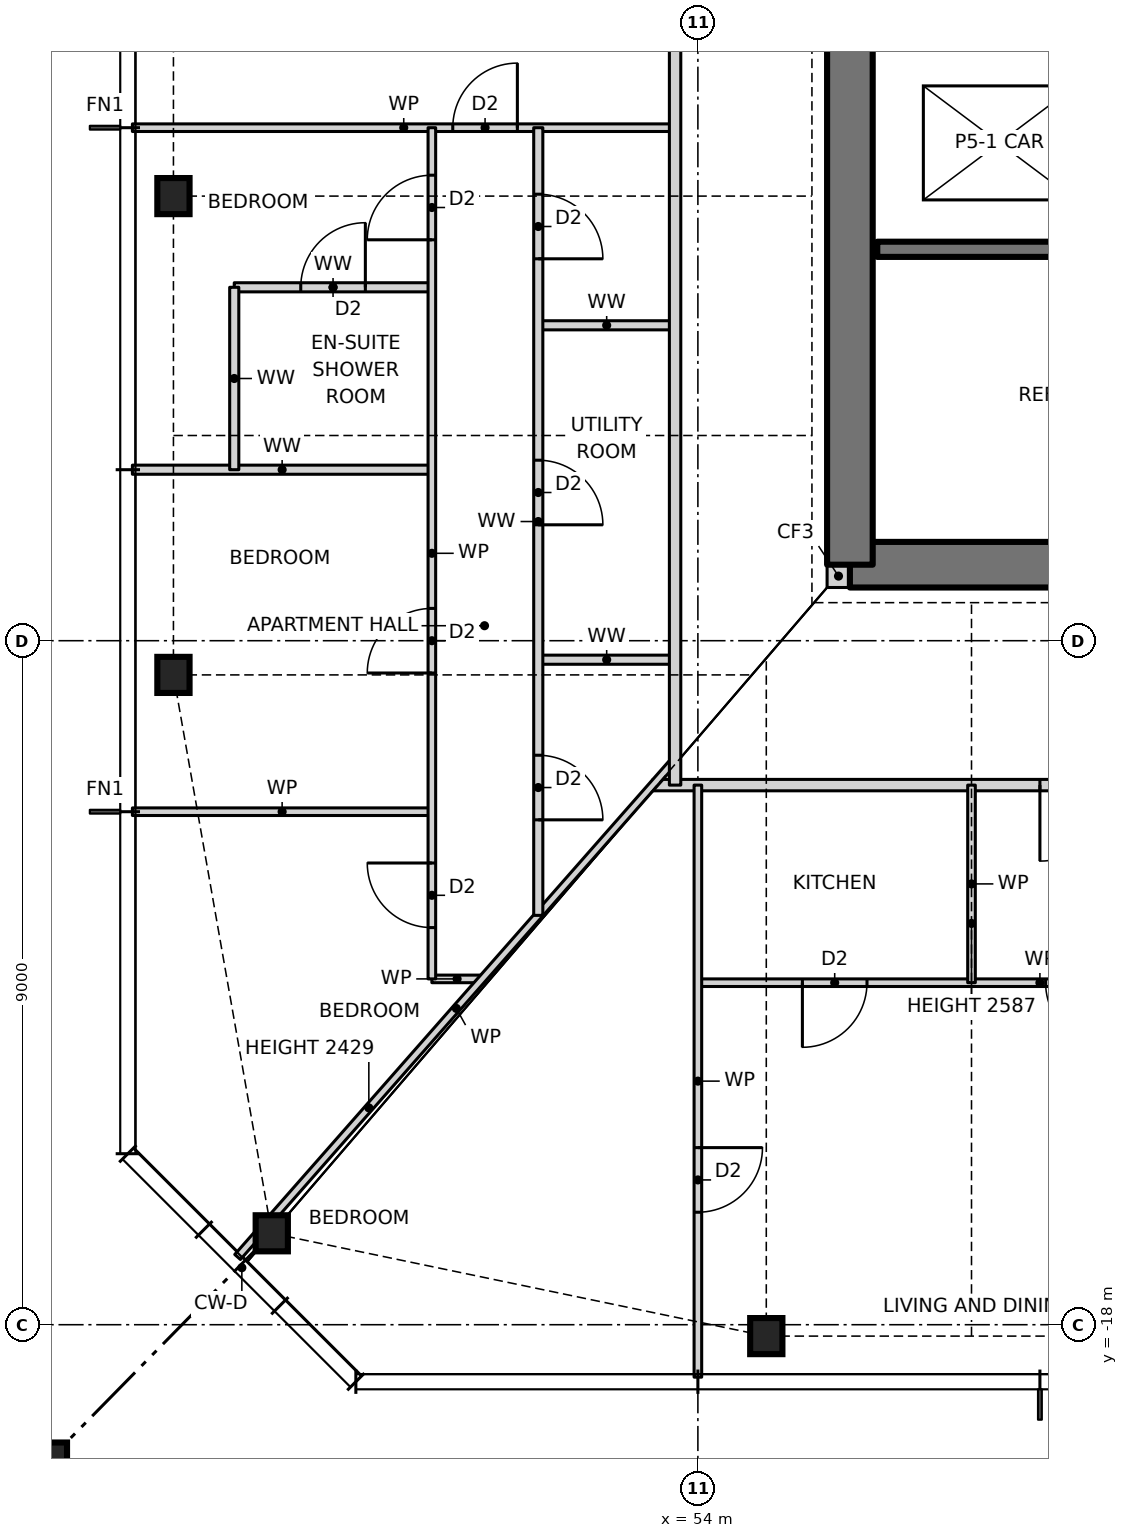
"""IFC4 building model, lengths in metres.
Left out: names, types, materials, properties, quantities, classifications, styles, units other than length and angle.
Written with IfcOpenShell. Run it as: python <this file> out.ifc"""

import sys

from ifc_helpers import new_model, si_unit, direction, frame, frame_2d, origin, origin_2d, place, context, subcontext, project, spatial, rectangle, hollow_rectangle, i_section, extrude, element, fill, save


model = new_model("IFC4")
c1 = context("Model", 3, precision=1e-05, world=origin(), true_north=direction((0.0, 1.0)))
c2 = subcontext(c1, "Body", "Model", "MODEL_VIEW")
j1 = project(units=[si_unit("LENGTHUNIT", "METRE"), si_unit("PLANEANGLEUNIT", "RADIAN")], contexts=[c1])
p1 = place(None, origin())
s1 = spatial("IfcSite", under=j1, at=p1, CompositionType="ELEMENT")
p2 = place(p1, origin())
s2 = spatial("IfcBuilding", under=s1, at=p2, CompositionType="ELEMENT")
p3 = place(p2, frame((0.0, 0.0, 60.5)))
s3 = spatial("IfcBuildingStorey", under=s2, at=p3, CompositionType="ELEMENT", Elevation=60.5)
for number, where, z_axis, x_axis in (
    (1, (48.394, -16.797, 0.0), (0.0, 0.0, 1.0), (1.0, 0.0, 0.0)),
    (2, (54.9, -18.15, 0.0), (0.0, 0.0, 1.0), (1.0, 0.0, 0.0)),
    (3, (47.1, -3.15, 0.0), (0.0, 0.0, 1.0), (1.0, 0.0, 0.0)),
    (4, (47.1, -9.45, 0.0), (0.0, 0.0, 1.0), (1.0, 0.0, 0.0)),
):
    element("IfcColumn", number, at=place(p3, frame(where, z_axis=z_axis, x_axis=x_axis)), inside=s3, PredefinedType="COLUMN", context=c2, shape_type="SweptSolid", body=[
        extrude(i_section(OverallWidth=0.424, OverallDepth=0.475, WebThickness=0.048, FlangeThickness=0.077, at=origin_2d()), origin(), (0.0, 0.0, 1.0), 3.5),
    ])
p4 = place(p3, frame((45.1, -20.15, 0.0), z_axis=(0.0, 0.0, 1.0), x_axis=(1.0, 0.0, 0.0)))
e5 = element("IfcColumn", 5, at=p4, inside=s3, PredefinedType="COLUMN", context=c2, shape_type="SweptSolid", body=[
    extrude(hollow_rectangle(XDim=1.2, YDim=1.2, WallThickness=0.07, at=origin_2d()), origin(), (0.0, 0.0, 1.0), 3.5),
])
p5 = place(p3, frame((55.7, -8.15, 0.0), z_axis=(0.0, 0.0, 1.0), x_axis=(1.0, 0.0, 0.0)))
e6 = element("IfcWall", 6, at=p5, inside=s3, PredefinedType="SOLIDWALL", context=c2, shape_type="SweptSolid", body=[
    extrude(rectangle(XDim=0.3, YDim=0.3, at=frame_2d((0.15, 0.0))), origin(), (0.0, 0.0, 1.0), 3.5),
])
p6 = place(p3, frame((56.0, -8.0, 0.0), z_axis=(0.0, 0.0, 1.0), x_axis=(1.0, 0.0, 0.0)))
e7 = element("IfcWall", 7, at=p6, inside=s3, PredefinedType="SHEAR", context=c2, shape_type="SweptSolid", body=[
    extrude(rectangle(XDim=14.0, YDim=0.6, at=frame_2d((7.0, 0.0))), origin(), (0.0, 0.0, 1.0), 3.5),
])
p7 = place(p6, frame((2.7, 0.0, 0.0)))
e8 = element("IfcOpeningElement", 8, at=p7, cuts=e7, PredefinedType="OPENING", context=c2, shape_type="SweptSolid", body=[
    extrude(rectangle(XDim=0.9, YDim=2.1, at=frame_2d((0.45, 1.05))), frame((0.0, 0.31, 0.0), z_axis=(0.0, -1.0, 0.0), x_axis=(1.0, 0.0, 0.0)), (0.0, 0.0, 1.0), 0.62),
])
p8 = place(p6, frame((7.7, 0.0, 0.0)))
e9 = element("IfcOpeningElement", 9, at=p8, cuts=e7, PredefinedType="OPENING", context=c2, shape_type="SweptSolid", body=[
    extrude(rectangle(XDim=0.9, YDim=2.1, at=frame_2d((0.45, 1.05))), frame((0.0, 0.31, 0.0), z_axis=(0.0, -1.0, 0.0), x_axis=(1.0, 0.0, 0.0)), (0.0, 0.0, 1.0), 0.62),
])
p9 = place(p3, frame((56.0, 8.0, 0.0), z_axis=(0.0, 0.0, 1.0), x_axis=(0.0, -1.0, 0.0)))
e10 = element("IfcWall", 10, at=p9, inside=s3, PredefinedType="SHEAR", context=c2, shape_type="SweptSolid", body=[
    extrude(rectangle(XDim=16.0, YDim=0.6, at=frame_2d((8.0, 0.0))), origin(), (0.0, 0.0, 1.0), 3.5),
])
p10 = place(p9, frame((7.5, 0.0, 0.0)))
e11 = element("IfcOpeningElement", 11, at=p10, cuts=e10, PredefinedType="OPENING", context=c2, shape_type="SweptSolid", body=[
    extrude(rectangle(XDim=1.0, YDim=2.1, at=frame_2d((0.5, 1.05))), frame((0.0, 0.31, 0.0), z_axis=(0.0, -1.0, 0.0), x_axis=(1.0, 0.0, 0.0)), (0.0, 0.0, 1.0), 0.62),
])
p11 = place(p3, frame((54.0, -13.5, 0.0), z_axis=(0.0, 0.0, 1.0), x_axis=(1.0, 0.0, 0.0)))
e12 = element("IfcWall", 12, at=p11, inside=s3, PredefinedType="PARTITIONING", context=c2, shape_type="SweptSolid", body=[
    extrude(rectangle(XDim=9.0, YDim=0.1, at=frame_2d((4.5, 0.0))), origin(), (0.0, 0.0, 1.0), 3.27),
])
p12 = place(p11, frame((1.375, 0.0, 0.0)))
e13 = element("IfcOpeningElement", 13, at=p12, cuts=e12, PredefinedType="OPENING", context=c2, shape_type="SweptSolid", body=[
    extrude(rectangle(XDim=0.85, YDim=2.1, at=frame_2d((0.425, 1.05))), frame((0.0, 0.06, 0.0), z_axis=(0.0, -1.0, 0.0), x_axis=(1.0, 0.0, 0.0)), (0.0, 0.0, 1.0), 0.12),
])
p13 = place(p11, frame((4.575, 0.0, 0.0)))
e14 = element("IfcOpeningElement", 14, at=p13, cuts=e12, PredefinedType="OPENING", context=c2, shape_type="SweptSolid", body=[
    extrude(rectangle(XDim=0.85, YDim=2.1, at=frame_2d((0.425, 1.05))), frame((0.0, 0.06, 0.0), z_axis=(0.0, -1.0, 0.0), x_axis=(1.0, 0.0, 0.0)), (0.0, 0.0, 1.0), 0.12),
])
p14 = place(p3, frame((50.5, -13.45, 0.0), z_axis=(0.0, 0.0, 1.0), x_axis=(1.0, 0.0, 0.0)))
e15 = element("IfcWall", 15, at=p14, inside=s3, PredefinedType="PARTITIONING", context=c2, shape_type="SweptSolid", body=[
    extrude(rectangle(XDim=0.664, YDim=0.1, at=frame_2d((0.332, 0.0))), origin(), (0.0, 0.0, 1.0), 3.27),
])
p15 = place(p3, frame((46.56, -11.25, 0.0), z_axis=(0.0, 0.0, 1.0), x_axis=(1.0, 0.0, 0.0)))
e16 = element("IfcWall", 16, at=p15, inside=s3, PredefinedType="PARTITIONING", context=c2, shape_type="SweptSolid", body=[
    extrude(rectangle(XDim=3.94, YDim=0.1, at=frame_2d((1.97, 0.0))), origin(), (0.0, 0.0, 1.0), 3.27),
])
p16 = place(p3, frame((53.408, -10.9, 0.0), z_axis=(0.0, 0.0, 1.0), x_axis=(1.0, 0.0, 0.0)))
e17 = element("IfcWall", 17, at=p16, inside=s3, PredefinedType="PARTITIONING", context=c2, shape_type="SweptSolid", body=[
    extrude(rectangle(XDim=19.184, YDim=0.15, at=frame_2d((9.592, 0.0))), origin(), (0.0, 0.0, 1.0), 3.27),
])
p17 = place(p16, frame((5.092, 0.0, 0.0)))
e18 = element("IfcOpeningElement", 18, at=p17, cuts=e17, PredefinedType="OPENING", context=c2, shape_type="SweptSolid", body=[
    extrude(rectangle(XDim=1.0, YDim=2.1, at=frame_2d((0.5, 1.05))), frame((0.0, 0.085, 0.0), z_axis=(0.0, -1.0, 0.0), x_axis=(1.0, 0.0, 0.0)), (0.0, 0.0, 1.0), 0.17),
])
p18 = place(p16, frame((10.492, 0.0, 0.0)))
e19 = element("IfcOpeningElement", 19, at=p18, cuts=e17, PredefinedType="OPENING", context=c2, shape_type="SweptSolid", body=[
    extrude(rectangle(XDim=1.0, YDim=2.1, at=frame_2d((0.5, 1.05))), frame((0.0, 0.085, 0.0), z_axis=(0.0, -1.0, 0.0), x_axis=(1.0, 0.0, 0.0)), (0.0, 0.0, 1.0), 0.17),
])
p19 = place(p3, frame((51.9, -9.25, 0.0), z_axis=(0.0, 0.0, 1.0), x_axis=(1.0, 0.0, 0.0)))
e20 = element("IfcWall", 20, at=p19, inside=s3, PredefinedType="PARTITIONING", context=c2, shape_type="SweptSolid", body=[
    extrude(rectangle(XDim=1.8, YDim=0.12, at=frame_2d((0.9, 0.0))), origin(), (0.0, 0.0, 1.0), 3.27),
])
p20 = place(p3, frame((46.56, -6.75, 0.0), z_axis=(0.0, 0.0, 1.0), x_axis=(1.0, 0.0, 0.0)))
e21 = element("IfcWall", 21, at=p20, inside=s3, PredefinedType="PARTITIONING", context=c2, shape_type="SweptSolid", body=[
    extrude(rectangle(XDim=3.94, YDim=0.12, at=frame_2d((1.97, 0.0))), origin(), (0.0, 0.0, 1.0), 3.27),
])
p21 = place(p3, frame((51.9, -4.85, 0.0), z_axis=(0.0, 0.0, 1.0), x_axis=(1.0, 0.0, 0.0)))
e22 = element("IfcWall", 22, at=p21, inside=s3, PredefinedType="PARTITIONING", context=c2, shape_type="SweptSolid", body=[
    extrude(rectangle(XDim=1.8, YDim=0.12, at=frame_2d((0.9, 0.0))), origin(), (0.0, 0.0, 1.0), 3.27),
])
p22 = place(p3, frame((47.9, -4.35, 0.0), z_axis=(0.0, 0.0, 1.0), x_axis=(1.0, 0.0, 0.0)))
e23 = element("IfcWall", 23, at=p22, inside=s3, PredefinedType="PARTITIONING", context=c2, shape_type="SweptSolid", body=[
    extrude(rectangle(XDim=2.6, YDim=0.12, at=frame_2d((1.3, 0.0))), origin(), (0.0, 0.0, 1.0), 3.27),
])
p23 = place(p22, frame((0.875, 0.0, 0.0)))
e24 = element("IfcOpeningElement", 24, at=p23, cuts=e23, PredefinedType="OPENING", context=c2, shape_type="SweptSolid", body=[
    extrude(rectangle(XDim=0.85, YDim=2.1, at=frame_2d((0.425, 1.05))), frame((0.0, 0.07, 0.0), z_axis=(0.0, -1.0, 0.0), x_axis=(1.0, 0.0, 0.0)), (0.0, 0.0, 1.0), 0.14),
])
p24 = place(p3, frame((56.36, -3.85, 0.0), z_axis=(0.0, 0.0, 1.0), x_axis=(1.0, 0.0, 0.0)))
e25 = element("IfcWall", 25, at=p24, inside=s3, PredefinedType="SOLIDWALL", context=c2, shape_type="SweptSolid", body=[
    extrude(rectangle(XDim=9.94, YDim=0.2, at=frame_2d((4.97, 0.0))), origin(), (0.0, 0.0, 1.0), 3.5),
])
p25 = place(p3, frame((46.56, -2.25, 0.0), z_axis=(0.0, 0.0, 1.0), x_axis=(1.0, 0.0, 0.0)))
e26 = element("IfcWall", 26, at=p25, inside=s3, PredefinedType="PARTITIONING", context=c2, shape_type="SweptSolid", body=[
    extrude(rectangle(XDim=7.14, YDim=0.1, at=frame_2d((3.57, 0.0))), origin(), (0.0, 0.0, 1.0), 3.27),
])
p26 = place(p25, frame((4.215, 0.0, 0.0)))
e27 = element("IfcOpeningElement", 27, at=p26, cuts=e26, PredefinedType="OPENING", context=c2, shape_type="SweptSolid", body=[
    extrude(rectangle(XDim=0.85, YDim=2.1, at=frame_2d((0.425, 1.05))), frame((0.0, 0.06, 0.0), z_axis=(0.0, -1.0, 0.0), x_axis=(1.0, 0.0, 0.0)), (0.0, 0.0, 1.0), 0.12),
])
p27 = place(p3, frame((47.944, -17.109, 0.0), z_axis=(0.0, 0.0, 1.0), x_axis=(0.660612734851, 0.750726857487, 0.0)))
e28 = element("IfcWall", 28, at=p27, inside=s3, PredefinedType="PARTITIONING", context=c2, shape_type="SweptSolid", body=[
    extrude(rectangle(XDim=8.713, YDim=0.1, at=frame_2d((4.356, 0.0))), origin(), (0.0, 0.0, 1.0), 2.429),
])
p28 = place(p3, frame((57.6, -13.5, 0.0), z_axis=(0.0, 0.0, 1.0), x_axis=(0.0, 1.0, 0.0)))
e29 = element("IfcWall", 29, at=p28, inside=s3, PredefinedType="PARTITIONING", context=c2, shape_type="SweptSolid", body=[
    extrude(rectangle(XDim=2.6, YDim=0.1, at=frame_2d((1.3, 0.0))), origin(), (0.0, 0.0, 1.0), 2.587),
])
p29 = place(p3, frame((54.0, -18.69, 0.0), z_axis=(0.0, 0.0, 1.0), x_axis=(0.0, 1.0, 0.0)))
e30 = element("IfcWall", 30, at=p29, inside=s3, PredefinedType="PARTITIONING", context=c2, shape_type="SweptSolid", body=[
    extrude(rectangle(XDim=7.79, YDim=0.1, at=frame_2d((3.895, 0.0))), origin(), (0.0, 0.0, 1.0), 3.27),
])
p30 = place(p29, frame((2.17, 0.0, 0.0)))
e31 = element("IfcOpeningElement", 31, at=p30, cuts=e30, PredefinedType="OPENING", context=c2, shape_type="SweptSolid", body=[
    extrude(rectangle(XDim=0.85, YDim=2.1, at=frame_2d((0.425, 1.05))), frame((0.0, 0.06, 0.0), z_axis=(0.0, -1.0, 0.0), x_axis=(1.0, 0.0, 0.0)), (0.0, 0.0, 1.0), 0.12),
])
p31 = place(p3, frame((53.7, -10.9, 0.0), z_axis=(0.0, 0.0, 1.0), x_axis=(0.0, 1.0, 0.0)))
e32 = element("IfcWall", 32, at=p31, inside=s3, PredefinedType="PARTITIONING", context=c2, shape_type="SweptSolid", body=[
    extrude(rectangle(XDim=21.468, YDim=0.15, at=frame_2d((10.734, 0.0))), origin(), (0.0, 0.0, 1.0), 3.27),
])
p32 = place(p31, frame((16.65, 0.0, 0.0)))
e33 = element("IfcOpeningElement", 33, at=p32, cuts=e32, PredefinedType="OPENING", context=c2, shape_type="SweptSolid", body=[
    extrude(rectangle(XDim=1.0, YDim=2.1, at=frame_2d((0.5, 1.05))), frame((0.0, 0.085, 0.0), z_axis=(0.0, -1.0, 0.0), x_axis=(1.0, 0.0, 0.0)), (0.0, 0.0, 1.0), 0.17),
])
p33 = place(p31, frame((11.25, 0.0, 0.0)))
e34 = element("IfcOpeningElement", 34, at=p33, cuts=e32, PredefinedType="OPENING", context=c2, shape_type="SweptSolid", body=[
    extrude(rectangle(XDim=1.0, YDim=2.1, at=frame_2d((0.5, 1.05))), frame((0.0, 0.085, 0.0), z_axis=(0.0, -1.0, 0.0), x_axis=(1.0, 0.0, 0.0)), (0.0, 0.0, 1.0), 0.17),
])
p34 = place(p3, frame((51.9, -12.614, 0.0), z_axis=(0.0, 0.0, 1.0), x_axis=(0.0, 1.0, 0.0)))
e35 = element("IfcWall", 35, at=p34, inside=s3, PredefinedType="PARTITIONING", context=c2, shape_type="SweptSolid", body=[
    extrude(rectangle(XDim=10.364, YDim=0.12, at=frame_2d((5.182, 0.0))), origin(), (0.0, 0.0, 1.0), 3.27),
])
p35 = place(p34, frame((8.639, 0.0, 0.0)))
e36 = element("IfcOpeningElement", 36, at=p35, cuts=e35, PredefinedType="OPENING", context=c2, shape_type="SweptSolid", body=[
    extrude(rectangle(XDim=0.85, YDim=2.1, at=frame_2d((0.425, 1.05))), frame((0.0, 0.07, 0.0), z_axis=(0.0, -1.0, 0.0), x_axis=(1.0, 0.0, 0.0)), (0.0, 0.0, 1.0), 0.14),
])
p36 = place(p34, frame((5.139, 0.0, 0.0)))
e37 = element("IfcOpeningElement", 37, at=p36, cuts=e35, PredefinedType="OPENING", context=c2, shape_type="SweptSolid", body=[
    extrude(rectangle(XDim=0.85, YDim=2.1, at=frame_2d((0.425, 1.05))), frame((0.0, 0.07, 0.0), z_axis=(0.0, -1.0, 0.0), x_axis=(1.0, 0.0, 0.0)), (0.0, 0.0, 1.0), 0.14),
])
p37 = place(p34, frame((1.257, 0.0, 0.0)))
e38 = element("IfcOpeningElement", 38, at=p37, cuts=e35, PredefinedType="OPENING", context=c2, shape_type="SweptSolid", body=[
    extrude(rectangle(XDim=0.85, YDim=2.1, at=frame_2d((0.425, 1.05))), frame((0.0, 0.07, 0.0), z_axis=(0.0, -1.0, 0.0), x_axis=(1.0, 0.0, 0.0)), (0.0, 0.0, 1.0), 0.14),
])
p38 = place(p3, frame((50.5, -13.45, 0.0), z_axis=(0.0, 0.0, 1.0), x_axis=(0.0, 1.0, 0.0)))
e39 = element("IfcWall", 39, at=p38, inside=s3, PredefinedType="PARTITIONING", context=c2, shape_type="SweptSolid", body=[
    extrude(rectangle(XDim=11.2, YDim=0.1, at=frame_2d((5.6, 0.0))), origin(), (0.0, 0.0, 1.0), 3.27),
])
p39 = place(p38, frame((9.725, 0.0, 0.0)))
e40 = element("IfcOpeningElement", 40, at=p39, cuts=e39, PredefinedType="OPENING", context=c2, shape_type="SweptSolid", body=[
    extrude(rectangle(XDim=0.85, YDim=2.1, at=frame_2d((0.425, 1.05))), frame((0.0, 0.06, 0.0), z_axis=(0.0, -1.0, 0.0), x_axis=(1.0, 0.0, 0.0)), (0.0, 0.0, 1.0), 0.12),
])
p40 = place(p38, frame((4.025, 0.0, 0.0)))
e41 = element("IfcOpeningElement", 41, at=p40, cuts=e39, PredefinedType="OPENING", context=c2, shape_type="SweptSolid", body=[
    extrude(rectangle(XDim=0.85, YDim=2.1, at=frame_2d((0.425, 1.05))), frame((0.0, 0.06, 0.0), z_axis=(0.0, -1.0, 0.0), x_axis=(1.0, 0.0, 0.0)), (0.0, 0.0, 1.0), 0.12),
])
p41 = place(p38, frame((0.675, 0.0, 0.0)))
e42 = element("IfcOpeningElement", 42, at=p41, cuts=e39, PredefinedType="OPENING", context=c2, shape_type="SweptSolid", body=[
    extrude(rectangle(XDim=0.85, YDim=2.1, at=frame_2d((0.425, 1.05))), frame((0.0, 0.06, 0.0), z_axis=(0.0, -1.0, 0.0), x_axis=(1.0, 0.0, 0.0)), (0.0, 0.0, 1.0), 0.12),
])
p42 = place(p3, frame((47.9, -6.75, 0.0), z_axis=(0.0, 0.0, 1.0), x_axis=(0.0, 1.0, 0.0)))
e43 = element("IfcWall", 43, at=p42, inside=s3, PredefinedType="PARTITIONING", context=c2, shape_type="SweptSolid", body=[
    extrude(rectangle(XDim=2.4, YDim=0.12, at=frame_2d((1.2, 0.0))), origin(), (0.0, 0.0, 1.0), 3.27),
])
p43 = place(p12, frame((0.85, 0.0, 0.0), z_axis=(0.0, 0.0, 1.0), x_axis=(-1.0, 0.0, 0.0)))
e44 = element("IfcDoor", 44, at=p43, inside=s3, OperationType="SINGLE_SWING_RIGHT", PredefinedType="DOOR", context=c2, shape_type="SweptSolid", body=[
    extrude(rectangle(XDim=0.85, YDim=2.1, at=frame_2d((0.425, 1.05))), frame((0.0, 0.025, 0.0), z_axis=(0.0, -1.0, 0.0), x_axis=(1.0, 0.0, 0.0)), (0.0, 0.0, 1.0), 0.05),
])
fill(e13, e44)
p44 = place(p17, frame((1.0, 0.0, 0.0), z_axis=(0.0, 0.0, 1.0), x_axis=(-1.0, 0.0, 0.0)))
e45 = element("IfcDoor", 45, at=p44, inside=s3, OperationType="SINGLE_SWING_RIGHT", PredefinedType="DOOR", context=c2, shape_type="SweptSolid", body=[
    extrude(rectangle(XDim=1.0, YDim=2.1, at=frame_2d((0.5, 1.05))), frame((0.0, 0.025, 0.0), z_axis=(0.0, -1.0, 0.0), x_axis=(1.0, 0.0, 0.0)), (0.0, 0.0, 1.0), 0.05),
])
fill(e18, e45)
p45 = place(p13, frame((0.85, 0.0, 0.0), z_axis=(0.0, 0.0, 1.0), x_axis=(-1.0, 0.0, 0.0)))
e46 = element("IfcDoor", 46, at=p45, inside=s3, OperationType="SINGLE_SWING_LEFT", PredefinedType="DOOR", context=c2, shape_type="SweptSolid", body=[
    extrude(rectangle(XDim=0.85, YDim=2.1, at=frame_2d((0.425, 1.05))), frame((0.0, 0.025, 0.0), z_axis=(0.0, -1.0, 0.0), x_axis=(1.0, 0.0, 0.0)), (0.0, 0.0, 1.0), 0.05),
])
fill(e14, e46)
p46 = place(p30, frame((0.85, 0.0, 0.0), z_axis=(0.0, 0.0, 1.0), x_axis=(-1.0, 0.0, 0.0)))
e47 = element("IfcDoor", 47, at=p46, inside=s3, OperationType="SINGLE_SWING_LEFT", PredefinedType="DOOR", context=c2, shape_type="SweptSolid", body=[
    extrude(rectangle(XDim=0.85, YDim=2.1, at=frame_2d((0.425, 1.05))), frame((0.0, 0.025, 0.0), z_axis=(0.0, -1.0, 0.0), x_axis=(1.0, 0.0, 0.0)), (0.0, 0.0, 1.0), 0.05),
])
fill(e31, e47)
p47 = place(p26, origin())
e48 = element("IfcDoor", 48, at=p47, inside=s3, OperationType="SINGLE_SWING_RIGHT", PredefinedType="DOOR", context=c2, shape_type="SweptSolid", body=[
    extrude(rectangle(XDim=0.85, YDim=2.1, at=frame_2d((0.425, 1.05))), frame((0.0, 0.025, 0.0), z_axis=(0.0, -1.0, 0.0), x_axis=(1.0, 0.0, 0.0)), (0.0, 0.0, 1.0), 0.05),
])
fill(e27, e48)
p48 = place(p23, origin())
e49 = element("IfcDoor", 49, at=p48, inside=s3, OperationType="SINGLE_SWING_RIGHT", PredefinedType="DOOR", context=c2, shape_type="SweptSolid", body=[
    extrude(rectangle(XDim=0.85, YDim=2.1, at=frame_2d((0.425, 1.05))), frame((0.0, 0.025, 0.0), z_axis=(0.0, -1.0, 0.0), x_axis=(1.0, 0.0, 0.0)), (0.0, 0.0, 1.0), 0.05),
])
fill(e24, e49)
p49 = place(p39, origin())
e50 = element("IfcDoor", 50, at=p49, inside=s3, OperationType="SINGLE_SWING_LEFT", PredefinedType="DOOR", context=c2, shape_type="SweptSolid", body=[
    extrude(rectangle(XDim=0.85, YDim=2.1, at=frame_2d((0.425, 1.05))), frame((0.0, 0.025, 0.0), z_axis=(0.0, -1.0, 0.0), x_axis=(1.0, 0.0, 0.0)), (0.0, 0.0, 1.0), 0.05),
])
fill(e40, e50)
p50 = place(p40, origin())
e51 = element("IfcDoor", 51, at=p50, inside=s3, OperationType="SINGLE_SWING_LEFT", PredefinedType="DOOR", context=c2, shape_type="SweptSolid", body=[
    extrude(rectangle(XDim=0.85, YDim=2.1, at=frame_2d((0.425, 1.05))), frame((0.0, 0.025, 0.0), z_axis=(0.0, -1.0, 0.0), x_axis=(1.0, 0.0, 0.0)), (0.0, 0.0, 1.0), 0.05),
])
fill(e41, e51)
p51 = place(p41, origin())
e52 = element("IfcDoor", 52, at=p51, inside=s3, OperationType="SINGLE_SWING_RIGHT", PredefinedType="DOOR", context=c2, shape_type="SweptSolid", body=[
    extrude(rectangle(XDim=0.85, YDim=2.1, at=frame_2d((0.425, 1.05))), frame((0.0, 0.025, 0.0), z_axis=(0.0, -1.0, 0.0), x_axis=(1.0, 0.0, 0.0)), (0.0, 0.0, 1.0), 0.05),
])
fill(e42, e52)
p52 = place(p35, frame((0.85, 0.0, 0.0), z_axis=(0.0, 0.0, 1.0), x_axis=(-1.0, 0.0, 0.0)))
e53 = element("IfcDoor", 53, at=p52, inside=s3, OperationType="SINGLE_SWING_RIGHT", PredefinedType="DOOR", context=c2, shape_type="SweptSolid", body=[
    extrude(rectangle(XDim=0.85, YDim=2.1, at=frame_2d((0.425, 1.05))), frame((0.0, 0.025, 0.0), z_axis=(0.0, -1.0, 0.0), x_axis=(1.0, 0.0, 0.0)), (0.0, 0.0, 1.0), 0.05),
])
fill(e36, e53)
p53 = place(p36, frame((0.85, 0.0, 0.0), z_axis=(0.0, 0.0, 1.0), x_axis=(-1.0, 0.0, 0.0)))
e54 = element("IfcDoor", 54, at=p53, inside=s3, OperationType="SINGLE_SWING_RIGHT", PredefinedType="DOOR", context=c2, shape_type="SweptSolid", body=[
    extrude(rectangle(XDim=0.85, YDim=2.1, at=frame_2d((0.425, 1.05))), frame((0.0, 0.025, 0.0), z_axis=(0.0, -1.0, 0.0), x_axis=(1.0, 0.0, 0.0)), (0.0, 0.0, 1.0), 0.05),
])
fill(e37, e54)
p54 = place(p37, frame((0.85, 0.0, 0.0), z_axis=(0.0, 0.0, 1.0), x_axis=(-1.0, 0.0, 0.0)))
e55 = element("IfcDoor", 55, at=p54, inside=s3, OperationType="SINGLE_SWING_RIGHT", PredefinedType="DOOR", context=c2, shape_type="SweptSolid", body=[
    extrude(rectangle(XDim=0.85, YDim=2.1, at=frame_2d((0.425, 1.05))), frame((0.0, 0.025, 0.0), z_axis=(0.0, -1.0, 0.0), x_axis=(1.0, 0.0, 0.0)), (0.0, 0.0, 1.0), 0.05),
])
fill(e38, e55)
save(model, sys.argv[1])
